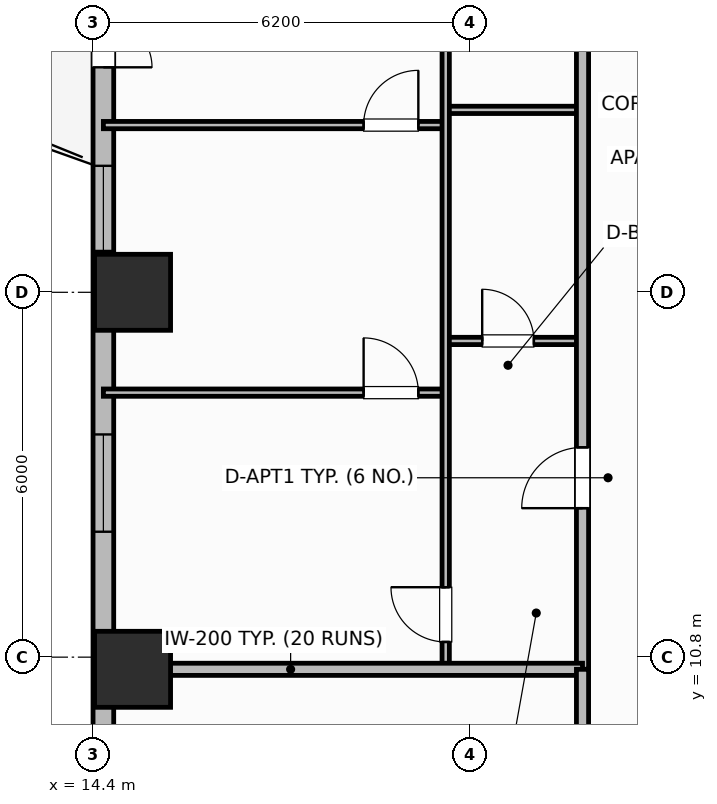
"""IFC4 building model, lengths in metres.
Left out: names, types, materials, properties, quantities, classifications, styles, units other than length and angle.
Written with IfcOpenShell. Run it as: python <this file> out.ifc"""

import sys

from ifc_helpers import new_model, si_unit, direction, frame, frame_2d, origin, origin_2d, place, context, subcontext, project, spatial, rectangle, extrude, element, fill, save


model = new_model("IFC4")
c1 = context("Model", 3, precision=1e-05, world=origin(), true_north=direction((0.0, 1.0)))
c2 = subcontext(c1, "Body", "Model", "MODEL_VIEW")
j1 = project(units=[si_unit("LENGTHUNIT", "METRE"), si_unit("PLANEANGLEUNIT", "RADIAN")], contexts=[c1])
p1 = place(None, origin())
s1 = spatial("IfcSite", under=j1, at=p1, CompositionType="ELEMENT")
p2 = place(p1, origin())
s2 = spatial("IfcBuilding", under=s1, at=p2, CompositionType="ELEMENT")
p3 = place(p2, frame((0.0, 0.0, 65.8)))
s3 = spatial("IfcBuildingStorey", under=s2, at=p3, CompositionType="ELEMENT", Elevation=65.8)
for number, where, z_axis, x_axis in (
    (1, (15.05, 10.6, 0.0), (0.0, 0.0, 1.0), (1.0, 0.0, 0.0)),
    (2, (15.05, 16.8, 0.0), (0.0, 0.0, 1.0), (1.0, 0.0, 0.0)),
):
    element("IfcColumn", number, at=place(p3, frame(where, z_axis=z_axis, x_axis=x_axis)), inside=s3, PredefinedType="COLUMN", context=c2, shape_type="SweptSolid", body=[
        extrude(rectangle(XDim=1.25, YDim=1.25, at=origin_2d()), origin(), (0.0, 0.0, 1.0), 3.7),
    ])
p4 = place(p3, frame((14.57, 23.8, 0.0), z_axis=(0.0, 0.0, 1.0), x_axis=(0.0, -1.0, 0.0)))
e3 = element("IfcWall", 3, at=p4, inside=s3, PredefinedType="SOLIDWALL", context=c2, shape_type="SweptSolid", body=[
    extrude(rectangle(XDim=14.8, YDim=0.34, at=frame_2d((7.4, 0.0))), origin(), (0.0, 0.0, 1.0), 2.7),
])
p5 = place(p4, frame((1.7, 0.0, 0.0)))
e4 = element("IfcOpeningElement", 4, at=p5, cuts=e3, PredefinedType="OPENING", context=c2, shape_type="SweptSolid", body=[
    extrude(rectangle(XDim=1.6, YDim=2.1, at=frame_2d((0.8, 1.05))), frame((0.0, 0.18, 0.0), z_axis=(0.0, -1.0, 0.0), x_axis=(1.0, 0.0, 0.0)), (0.0, 0.0, 1.0), 0.36),
])
p6 = place(p4, frame((4.92, 0.0, 0.69)))
e5 = element("IfcOpeningElement", 5, at=p6, cuts=e3, PredefinedType="OPENING", context=c2, shape_type="SweptSolid", body=[
    extrude(rectangle(XDim=1.4, YDim=1.85, at=frame_2d((0.7, 0.925))), frame((0.0, 0.18, 0.0), z_axis=(0.0, -1.0, 0.0), x_axis=(1.0, 0.0, 0.0)), (0.0, 0.0, 1.0), 0.36),
])
p7 = place(p4, frame((9.337, 0.0, 0.68)))
e6 = element("IfcOpeningElement", 6, at=p7, cuts=e3, PredefinedType="OPENING", context=c2, shape_type="SweptSolid", body=[
    extrude(rectangle(XDim=1.6, YDim=1.9, at=frame_2d((0.8, 0.95))), frame((0.0, 0.18, 0.0), z_axis=(0.0, -1.0, 0.0), x_axis=(1.0, 0.0, 0.0)), (0.0, 0.0, 1.0), 0.36),
])
p8 = place(p3, frame((20.2, 16.0, 0.0), z_axis=(0.0, 0.0, 1.0), x_axis=(1.0, 0.0, 0.0)))
e7 = element("IfcWall", 7, at=p8, inside=s3, PredefinedType="PARTITIONING", context=c2, shape_type="SweptSolid", body=[
    extrude(rectangle(XDim=2.25, YDim=0.12, at=frame_2d((1.125, 0.0))), origin(), (0.0, 0.0, 1.0), 2.53),
])
p9 = place(p8, frame((0.6, 0.0, 0.0)))
e8 = element("IfcOpeningElement", 8, at=p9, cuts=e7, PredefinedType="OPENING", context=c2, shape_type="SweptSolid", body=[
    extrude(rectangle(XDim=0.85, YDim=2.1, at=frame_2d((0.425, 1.05))), frame((0.0, 0.07, 0.0), z_axis=(0.0, -1.0, 0.0), x_axis=(1.0, 0.0, 0.0)), (0.0, 0.0, 1.0), 0.14),
])
p10 = place(p3, frame((20.2, 19.8, 0.0), z_axis=(0.0, 0.0, 1.0), x_axis=(1.0, 0.0, 0.0)))
e9 = element("IfcWall", 9, at=p10, inside=s3, PredefinedType="PARTITIONING", context=c2, shape_type="SweptSolid", body=[
    extrude(rectangle(XDim=2.25, YDim=0.12, at=frame_2d((1.125, 0.0))), origin(), (0.0, 0.0, 1.0), 2.53),
])
p11 = place(p3, frame((14.57, 15.15, 0.0), z_axis=(0.0, 0.0, 1.0), x_axis=(1.0, 0.0, 0.0)))
e10 = element("IfcWall", 10, at=p11, inside=s3, PredefinedType="PARTITIONING", context=c2, shape_type="SweptSolid", body=[
    extrude(rectangle(XDim=5.63, YDim=0.12, at=frame_2d((2.815, 0.0))), origin(), (0.0, 0.0, 1.0), 2.53),
])
p12 = place(p11, frame((4.28, 0.0, 0.0)))
e11 = element("IfcOpeningElement", 11, at=p12, cuts=e10, PredefinedType="OPENING", context=c2, shape_type="SweptSolid", body=[
    extrude(rectangle(XDim=0.9, YDim=2.1, at=frame_2d((0.45, 1.05))), frame((0.0, 0.07, 0.0), z_axis=(0.0, -1.0, 0.0), x_axis=(1.0, 0.0, 0.0)), (0.0, 0.0, 1.0), 0.14),
])
p13 = place(p3, frame((14.57, 19.55, 0.0), z_axis=(0.0, 0.0, 1.0), x_axis=(1.0, 0.0, 0.0)))
e12 = element("IfcWall", 12, at=p13, inside=s3, PredefinedType="PARTITIONING", context=c2, shape_type="SweptSolid", body=[
    extrude(rectangle(XDim=5.63, YDim=0.12, at=frame_2d((2.815, 0.0))), origin(), (0.0, 0.0, 1.0), 2.53),
])
p14 = place(p13, frame((4.28, 0.0, 0.0)))
e13 = element("IfcOpeningElement", 13, at=p14, cuts=e12, PredefinedType="OPENING", context=c2, shape_type="SweptSolid", body=[
    extrude(rectangle(XDim=0.9, YDim=2.1, at=frame_2d((0.45, 1.05))), frame((0.0, 0.07, 0.0), z_axis=(0.0, -1.0, 0.0), x_axis=(1.0, 0.0, 0.0)), (0.0, 0.0, 1.0), 0.14),
])
p15 = place(p3, frame((20.2, 10.64, 0.0), z_axis=(0.0, 0.0, 1.0), x_axis=(0.0, 1.0, 0.0)))
e14 = element("IfcWall", 14, at=p15, inside=s3, PredefinedType="PARTITIONING", context=c2, shape_type="SweptSolid", body=[
    extrude(rectangle(XDim=15.408, YDim=0.12, at=frame_2d((7.704, 0.0))), origin(), (0.0, 0.0, 1.0), 2.53),
])
p16 = place(p15, frame((0.41, 0.0, 0.0)))
e15 = element("IfcOpeningElement", 15, at=p16, cuts=e14, PredefinedType="OPENING", context=c2, shape_type="SweptSolid", body=[
    extrude(rectangle(XDim=0.9, YDim=2.1, at=frame_2d((0.45, 1.05))), frame((0.0, 0.07, 0.0), z_axis=(0.0, -1.0, 0.0), x_axis=(1.0, 0.0, 0.0)), (0.0, 0.0, 1.0), 0.14),
])
p17 = place(p15, frame((11.879, 0.0, 0.0)))
e16 = element("IfcOpeningElement", 16, at=p17, cuts=e14, PredefinedType="OPENING", context=c2, shape_type="SweptSolid", body=[
    extrude(rectangle(XDim=0.82, YDim=2.08, at=frame_2d((0.41, 1.04))), frame((0.0, 0.07, 0.0), z_axis=(0.0, -1.0, 0.0), x_axis=(1.0, 0.0, 0.0)), (0.0, 0.0, 1.0), 0.14),
])
p18 = place(p3, frame((22.45, 10.6, 0.0), z_axis=(0.0, 0.0, 1.0), x_axis=(0.0, 1.0, 0.0)))
e17 = element("IfcWall", 17, at=p18, inside=s3, PredefinedType="PARTITIONING", context=c2, shape_type="SweptSolid", body=[
    extrude(rectangle(XDim=35.2, YDim=0.2, at=frame_2d((17.6, 0.0))), origin(), (0.0, 0.0, 1.0), 2.53),
])
p19 = place(p18, frame((2.65, 0.0, 0.0)))
e18 = element("IfcOpeningElement", 18, at=p19, cuts=e17, PredefinedType="OPENING", context=c2, shape_type="SweptSolid", body=[
    extrude(rectangle(XDim=1.0, YDim=2.15, at=frame_2d((0.5, 1.075))), frame((0.0, 0.11, 0.0), z_axis=(0.0, -1.0, 0.0), x_axis=(1.0, 0.0, 0.0)), (0.0, 0.0, 1.0), 0.22),
])
p20 = place(p18, frame((19.438, 0.0, 0.0)))
e19 = element("IfcOpeningElement", 19, at=p20, cuts=e17, PredefinedType="OPENING", context=c2, shape_type="SweptSolid", body=[
    extrude(rectangle(XDim=1.0, YDim=2.15, at=frame_2d((0.5, 1.075))), frame((0.0, 0.11, 0.0), z_axis=(0.0, -1.0, 0.0), x_axis=(1.0, 0.0, 0.0)), (0.0, 0.0, 1.0), 0.22),
])
p21 = place(p3, frame((14.99, 10.6, 0.0), z_axis=(0.0, 0.0, 1.0), x_axis=(1.0, 0.0, 0.0)))
e20 = element("IfcWall", 20, at=p21, inside=s3, PredefinedType="PARTITIONING", context=c2, shape_type="SweptSolid", body=[
    extrude(rectangle(XDim=7.46, YDim=0.2, at=frame_2d((3.73, 0.0))), origin(), (0.0, 0.0, 1.0), 2.53),
])
p22 = place(p3, frame((22.45, 4.97, 0.0), z_axis=(0.0, 0.0, 1.0), x_axis=(0.0, 1.0, 0.0)))
e21 = element("IfcWall", 21, at=p22, inside=s3, PredefinedType="PARTITIONING", context=c2, shape_type="SweptSolid", body=[
    extrude(rectangle(XDim=5.63, YDim=0.2, at=frame_2d((2.815, 0.0))), origin(), (0.0, 0.0, 1.0), 2.53),
])
p23 = place(p5, origin())
e22 = element("IfcDoor", 22, at=p23, inside=s3, OperationType="DOUBLE_DOOR_SINGLE_SWING", PredefinedType="DOOR", context=c2, shape_type="SweptSolid", body=[
    extrude(rectangle(XDim=1.6, YDim=2.1, at=frame_2d((0.8, 1.05))), frame((0.0, 0.025, 0.0), z_axis=(0.0, -1.0, 0.0), x_axis=(1.0, 0.0, 0.0)), (0.0, 0.0, 1.0), 0.05),
])
fill(e4, e22)
p24 = place(p6, origin())
e23 = element("IfcWindow", 23, at=p24, inside=s3, PartitioningType="SINGLE_PANEL", PredefinedType="WINDOW", context=c2, shape_type="SweptSolid", body=[
    extrude(rectangle(XDim=1.4, YDim=1.85, at=frame_2d((0.7, 0.925))), frame((0.0, 0.03, 0.0), z_axis=(0.0, -1.0, 0.0), x_axis=(1.0, 0.0, 0.0)), (0.0, 0.0, 1.0), 0.06),
])
fill(e5, e23)
p25 = place(p7, origin())
e24 = element("IfcWindow", 24, at=p25, inside=s3, PartitioningType="SINGLE_PANEL", PredefinedType="WINDOW", context=c2, shape_type="SweptSolid", body=[
    extrude(rectangle(XDim=1.6, YDim=1.9, at=frame_2d((0.8, 0.95))), frame((0.0, 0.03, 0.0), z_axis=(0.0, -1.0, 0.0), x_axis=(1.0, 0.0, 0.0)), (0.0, 0.0, 1.0), 0.06),
])
fill(e6, e24)
p26 = place(p9, origin())
e25 = element("IfcDoor", 25, at=p26, inside=s3, OperationType="SINGLE_SWING_LEFT", PredefinedType="DOOR", context=c2, shape_type="SweptSolid", body=[
    extrude(rectangle(XDim=0.85, YDim=2.1, at=frame_2d((0.425, 1.05))), frame((0.0, 0.025, 0.0), z_axis=(0.0, -1.0, 0.0), x_axis=(1.0, 0.0, 0.0)), (0.0, 0.0, 1.0), 0.05),
])
fill(e8, e25)
p27 = place(p12, origin())
e26 = element("IfcDoor", 26, at=p27, inside=s3, OperationType="SINGLE_SWING_LEFT", PredefinedType="DOOR", context=c2, shape_type="SweptSolid", body=[
    extrude(rectangle(XDim=0.9, YDim=2.1, at=frame_2d((0.45, 1.05))), frame((0.0, 0.025, 0.0), z_axis=(0.0, -1.0, 0.0), x_axis=(1.0, 0.0, 0.0)), (0.0, 0.0, 1.0), 0.05),
])
fill(e11, e26)
p28 = place(p14, origin())
e27 = element("IfcDoor", 27, at=p28, inside=s3, OperationType="SINGLE_SWING_RIGHT", PredefinedType="DOOR", context=c2, shape_type="SweptSolid", body=[
    extrude(rectangle(XDim=0.9, YDim=2.1, at=frame_2d((0.45, 1.05))), frame((0.0, 0.025, 0.0), z_axis=(0.0, -1.0, 0.0), x_axis=(1.0, 0.0, 0.0)), (0.0, 0.0, 1.0), 0.05),
])
fill(e13, e27)
p29 = place(p16, origin())
e28 = element("IfcDoor", 28, at=p29, inside=s3, OperationType="SINGLE_SWING_RIGHT", PredefinedType="DOOR", context=c2, shape_type="SweptSolid", body=[
    extrude(rectangle(XDim=0.9, YDim=2.1, at=frame_2d((0.45, 1.05))), frame((0.0, 0.025, 0.0), z_axis=(0.0, -1.0, 0.0), x_axis=(1.0, 0.0, 0.0)), (0.0, 0.0, 1.0), 0.05),
])
fill(e15, e28)
p30 = place(p19, origin())
e29 = element("IfcDoor", 29, at=p30, inside=s3, OperationType="SINGLE_SWING_LEFT", PredefinedType="DOOR", context=c2, shape_type="SweptSolid", body=[
    extrude(rectangle(XDim=1.0, YDim=2.15, at=frame_2d((0.5, 1.075))), frame((0.0, 0.025, 0.0), z_axis=(0.0, -1.0, 0.0), x_axis=(1.0, 0.0, 0.0)), (0.0, 0.0, 1.0), 0.05),
])
fill(e18, e29)
save(model, sys.argv[1])
